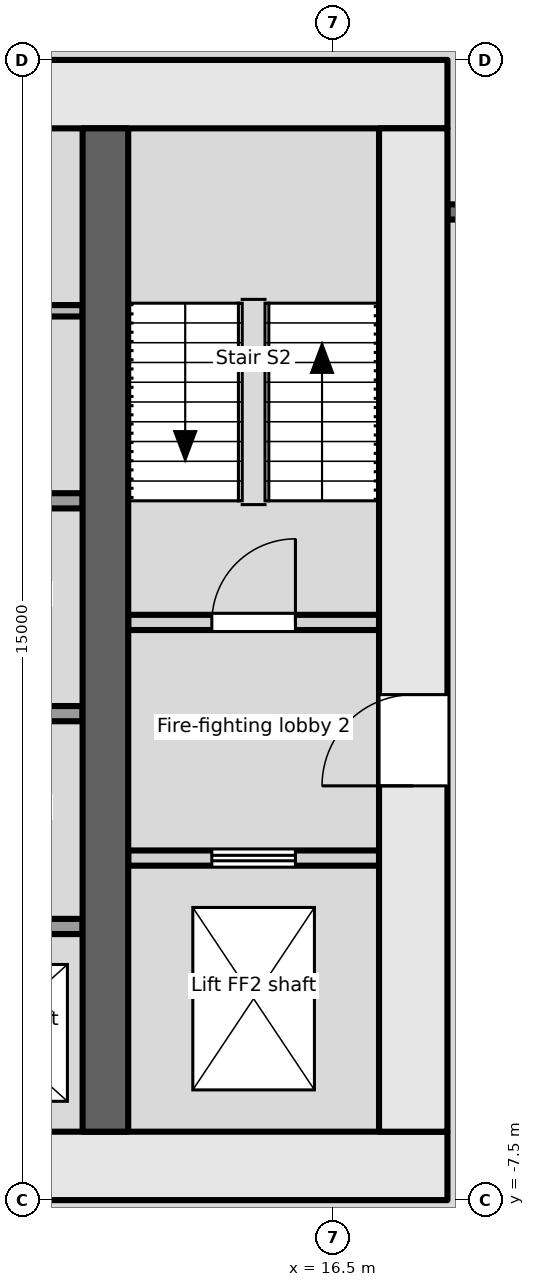
"""IFC4 building model, lengths in metres.
Left out: names, types, materials, properties, quantities, classifications, styles, units other than length and angle.
Written with IfcOpenShell. Run it as: python <this file> out.ifc"""

import sys

from ifc_helpers import new_model, si_unit, direction, frame, frame_2d, origin, place, context, subcontext, project, spatial, rectangle, extrude, element, fill, save


model = new_model("IFC4")
c1 = context("Model", 3, precision=1e-05, world=origin(), true_north=direction((0.0, 1.0)))
c2 = subcontext(c1, "Body", "Model", "MODEL_VIEW")
j1 = project(units=[si_unit("LENGTHUNIT", "METRE"), si_unit("PLANEANGLEUNIT", "RADIAN")], contexts=[c1])
p1 = place(None, origin())
s1 = spatial("IfcSite", under=j1, at=p1, CompositionType="ELEMENT")
p2 = place(p1, origin())
s2 = spatial("IfcBuilding", under=s1, at=p2, CompositionType="ELEMENT")
p3 = place(p2, frame((0.0, 0.0, -13.5)))
s3 = spatial("IfcBuildingStorey", under=s2, at=p3, CompositionType="ELEMENT", Elevation=-13.5)
p4 = place(p3, frame((-18.0, -7.05, -0.2), z_axis=(0.0, 0.0, 1.0), x_axis=(1.0, 0.0, 0.0)))
e1 = element("IfcWall", 1, at=p4, inside=s3, PredefinedType="SHEAR", context=c2, shape_type="SweptSolid", body=[
    extrude(rectangle(XDim=36.0, YDim=0.9, at=frame_2d((18.0, 0.0))), origin(), (0.0, 0.0, 1.0), 4.0),
])
p5 = place(p4, frame((8.1, 0.0, 0.2)))
e2 = element("IfcOpeningElement", 2, at=p5, cuts=e1, PredefinedType="OPENING", context=c2, shape_type="SweptSolid", body=[
    extrude(rectangle(XDim=1.8, YDim=2.1, at=frame_2d((0.9, 1.05))), frame((0.0, 0.46, 0.0), z_axis=(0.0, -1.0, 0.0), x_axis=(1.0, 0.0, 0.0)), (0.0, 0.0, 1.0), 0.921),
])
p6 = place(p4, frame((17.1, 0.0, 0.2)))
e3 = element("IfcOpeningElement", 3, at=p6, cuts=e1, PredefinedType="OPENING", context=c2, shape_type="SweptSolid", body=[
    extrude(rectangle(XDim=1.8, YDim=2.1, at=frame_2d((0.9, 1.05))), frame((0.0, 0.46, 0.0), z_axis=(0.0, -1.0, 0.0), x_axis=(1.0, 0.0, 0.0)), (0.0, 0.0, 1.0), 0.921),
])
p7 = place(p4, frame((26.1, 0.0, 0.2)))
e4 = element("IfcOpeningElement", 4, at=p7, cuts=e1, PredefinedType="OPENING", context=c2, shape_type="SweptSolid", body=[
    extrude(rectangle(XDim=2.4, YDim=2.1, at=frame_2d((1.2, 1.05))), frame((0.0, 0.46, 0.0), z_axis=(0.0, -1.0, 0.0), x_axis=(1.0, 0.0, 0.0)), (0.0, 0.0, 1.0), 0.921),
])
p8 = place(p3, frame((-18.0, 7.05, -0.2), z_axis=(0.0, 0.0, 1.0), x_axis=(1.0, 0.0, 0.0)))
e5 = element("IfcWall", 5, at=p8, inside=s3, PredefinedType="SHEAR", context=c2, shape_type="SweptSolid", body=[
    extrude(rectangle(XDim=36.0, YDim=0.9, at=frame_2d((18.0, 0.0))), origin(), (0.0, 0.0, 1.0), 4.0),
])
p9 = place(p3, frame((17.55, -6.6, -0.2), z_axis=(0.0, 0.0, 1.0), x_axis=(0.0, 1.0, 0.0)))
e6 = element("IfcWall", 6, at=p9, inside=s3, PredefinedType="SHEAR", context=c2, shape_type="SweptSolid", body=[
    extrude(rectangle(XDim=13.2, YDim=0.9, at=frame_2d((6.6, 0.0))), origin(), (0.0, 0.0, 1.0), 4.0),
])
p10 = place(p9, frame((4.55, 0.0, 0.2)))
e7 = element("IfcOpeningElement", 7, at=p10, cuts=e6, PredefinedType="OPENING", context=c2, shape_type="SweptSolid", body=[
    extrude(rectangle(XDim=1.2, YDim=2.1, at=frame_2d((0.6, 1.05))), frame((0.0, 0.46, 0.0), z_axis=(0.0, -1.0, 0.0), x_axis=(1.0, 0.0, 0.0)), (0.0, 0.0, 1.0), 0.921),
])
p11 = place(p3, frame((13.5, -6.6, -0.2), z_axis=(0.0, 0.0, 1.0), x_axis=(0.0, 1.0, 0.0)))
e8 = element("IfcWall", 8, at=p11, inside=s3, PredefinedType="SHEAR", context=c2, shape_type="SweptSolid", body=[
    extrude(rectangle(XDim=13.2, YDim=0.6, at=frame_2d((6.6, 0.0))), origin(), (0.0, 0.0, 1.0), 4.0),
])
p12 = place(p3, frame((13.8, -3.0, 0.0), z_axis=(0.0, 0.0, 1.0), x_axis=(1.0, 0.0, 0.0)))
e9 = element("IfcWall", 9, at=p12, inside=s3, PredefinedType="PARTITIONING", context=c2, shape_type="SweptSolid", body=[
    extrude(rectangle(XDim=3.3, YDim=0.2, at=frame_2d((1.65, 0.0))), origin(), (0.0, 0.0, 1.0), 3.8),
])
p13 = place(p12, frame((1.1, 0.0, 0.0)))
e10 = element("IfcOpeningElement", 10, at=p13, cuts=e9, PredefinedType="OPENING", context=c2, shape_type="SweptSolid", body=[
    extrude(rectangle(XDim=1.1, YDim=2.1, at=frame_2d((0.55, 1.05))), frame((0.0, 0.111, 0.0), z_axis=(0.0, -1.0, 0.0), x_axis=(1.0, 0.0, 0.0)), (0.0, 0.0, 1.0), 0.221),
])
p14 = place(p3, frame((13.8, 0.1, 0.0), z_axis=(0.0, 0.0, 1.0), x_axis=(1.0, 0.0, 0.0)))
e11 = element("IfcWall", 11, at=p14, inside=s3, PredefinedType="PARTITIONING", context=c2, shape_type="SweptSolid", body=[
    extrude(rectangle(XDim=3.3, YDim=0.2, at=frame_2d((1.65, 0.0))), origin(), (0.0, 0.0, 1.0), 3.8),
])
p15 = place(p14, frame((1.1, 0.0, 0.0)))
e12 = element("IfcOpeningElement", 12, at=p15, cuts=e11, PredefinedType="OPENING", context=c2, shape_type="SweptSolid", body=[
    extrude(rectangle(XDim=1.1, YDim=2.1, at=frame_2d((0.55, 1.05))), frame((0.0, 0.111, 0.0), z_axis=(0.0, -1.0, 0.0), x_axis=(1.0, 0.0, 0.0)), (0.0, 0.0, 1.0), 0.221),
])
for number, where, z_axis, x_axis in (
    (13, (10.9, -3.9, 0.0), (0.0, 0.0, 1.0), (1.0, 0.0, 0.0)),
    (14, (10.9, -1.1, 0.0), (0.0, 0.0, 1.0), (1.0, 0.0, 0.0)),
    (15, (10.9, 1.7, 0.0), (0.0, 0.0, 1.0), (1.0, 0.0, 0.0)),
):
    element("IfcWall", number, at=place(p3, frame(where, z_axis=z_axis, x_axis=x_axis)), inside=s3, PredefinedType="PARTITIONING", context=c2, shape_type="SweptSolid", body=[
        extrude(rectangle(XDim=2.3, YDim=0.2, at=frame_2d((1.15, 0.0))), origin(), (0.0, 0.0, 1.0), 3.8),
    ])
p16 = place(p3, frame((10.9, 4.2, 0.0), z_axis=(0.0, 0.0, 1.0), x_axis=(1.0, 0.0, 0.0)))
e16 = element("IfcWall", 16, at=p16, inside=s3, PredefinedType="PARTITIONING", context=c2, shape_type="SweptSolid", body=[
    extrude(rectangle(XDim=2.3, YDim=0.15, at=frame_2d((1.15, 0.0))), origin(), (0.0, 0.0, 1.0), 3.8),
])
p17 = place(p3, frame((18.0, 5.5, 0.0), z_axis=(0.0, 0.0, 1.0), x_axis=(1.0, 0.0, 0.0)))
e17 = element("IfcWall", 17, at=p17, inside=s3, PredefinedType="PARTITIONING", context=c2, shape_type="SweptSolid", body=[
    extrude(rectangle(XDim=2.4, YDim=0.2, at=frame_2d((1.2, 0.0))), origin(), (0.0, 0.0, 1.0), 3.8),
])
p18 = place(p17, frame((0.75, 0.0, 0.0)))
e18 = element("IfcOpeningElement", 18, at=p18, cuts=e17, PredefinedType="OPENING", context=c2, shape_type="SweptSolid", body=[
    extrude(rectangle(XDim=0.9, YDim=2.1, at=frame_2d((0.45, 1.05))), frame((0.0, 0.111, 0.0), z_axis=(0.0, -1.0, 0.0), x_axis=(1.0, 0.0, 0.0)), (0.0, 0.0, 1.0), 0.221),
])
p19 = place(p13, origin())
e19 = element("IfcDoor", 19, at=p19, inside=s3, OperationType="DOUBLE_DOOR_SLIDING", PredefinedType="DOOR", context=c2, shape_type="SweptSolid", body=[
    extrude(rectangle(XDim=1.1, YDim=2.1, at=frame_2d((0.55, 1.05))), frame((0.0, 0.025, 0.0), z_axis=(0.0, -1.0, 0.0), x_axis=(1.0, 0.0, 0.0)), (0.0, 0.0, 1.0), 0.05),
])
fill(e10, e19)
p20 = place(p10, origin())
e20 = element("IfcDoor", 20, at=p20, inside=s3, OperationType="SINGLE_SWING_LEFT", PredefinedType="DOOR", context=c2, shape_type="SweptSolid", body=[
    extrude(rectangle(XDim=1.2, YDim=2.1, at=frame_2d((0.6, 1.05))), frame((0.0, 0.025, 0.0), z_axis=(0.0, -1.0, 0.0), x_axis=(1.0, 0.0, 0.0)), (0.0, 0.0, 1.0), 0.05),
])
fill(e7, e20)
p21 = place(p15, origin())
e21 = element("IfcDoor", 21, at=p21, inside=s3, OperationType="SINGLE_SWING_RIGHT", PredefinedType="DOOR", context=c2, shape_type="SweptSolid", body=[
    extrude(rectangle(XDim=1.1, YDim=2.1, at=frame_2d((0.55, 1.05))), frame((0.0, 0.025, 0.0), z_axis=(0.0, -1.0, 0.0), x_axis=(1.0, 0.0, 0.0)), (0.0, 0.0, 1.0), 0.05),
])
fill(e12, e21)
save(model, sys.argv[1])
